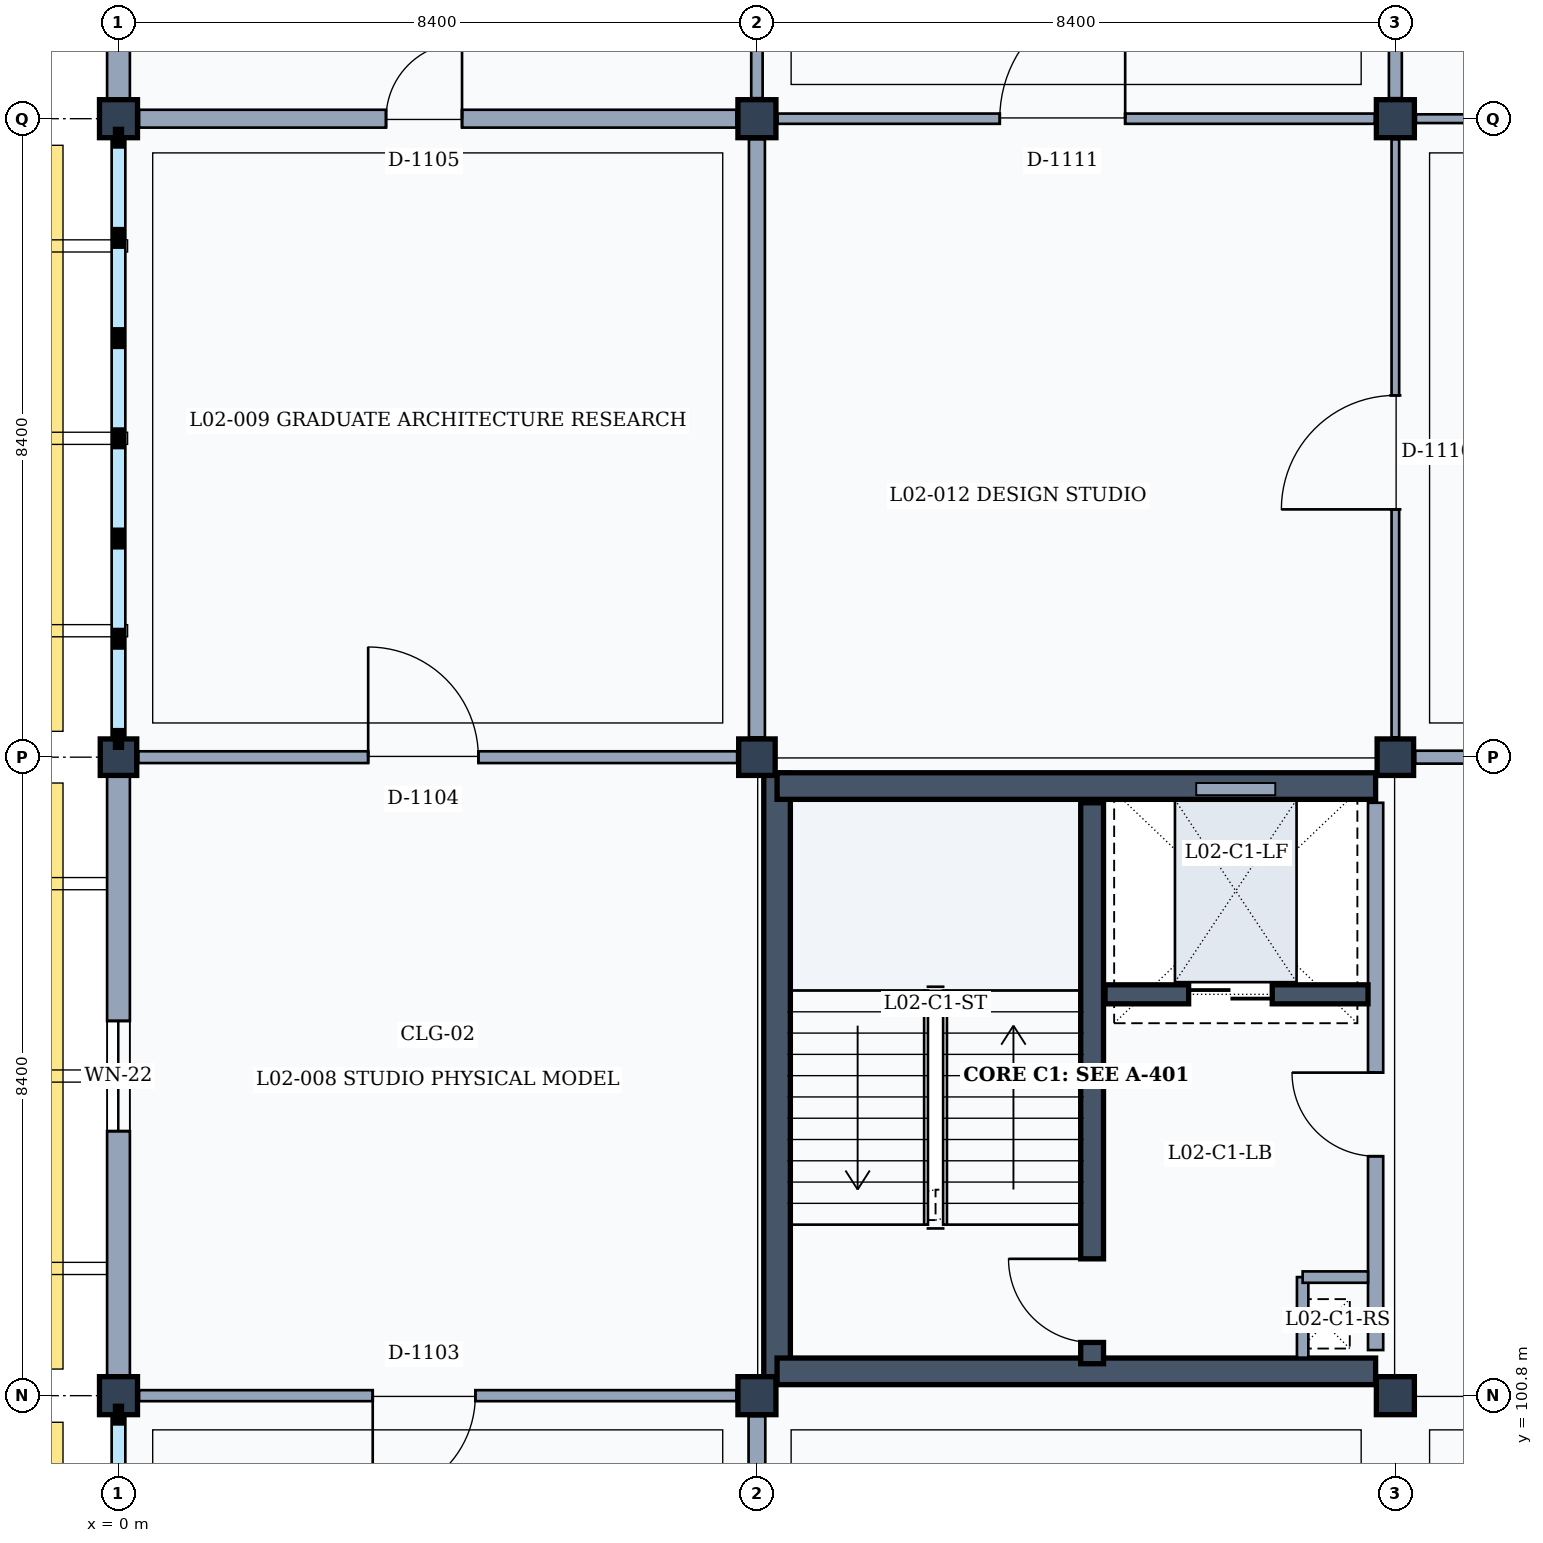
"""IFC4 building model, lengths in metres.
Left out: names, types, materials, properties, quantities, classifications, styles, units other than length and angle.
Written with IfcOpenShell. Run it as: python <this file> out.ifc"""

import sys

from ifc_helpers import new_model, si_unit, direction, frame, frame_2d, origin, origin_2d, place, context, subcontext, project, spatial, rectangle, extrude, element, fill, save


model = new_model("IFC4")
c1 = context("Model", 3, precision=1e-05, world=origin(), true_north=direction((0.0, 1.0)))
c2 = subcontext(c1, "Body", "Model", "MODEL_VIEW")
j1 = project(units=[si_unit("LENGTHUNIT", "METRE"), si_unit("PLANEANGLEUNIT", "RADIAN")], contexts=[c1])
p1 = place(None, origin())
s1 = spatial("IfcSite", under=j1, at=p1, CompositionType="ELEMENT")
p2 = place(p1, origin())
s2 = spatial("IfcBuilding", under=s1, at=p2, CompositionType="ELEMENT")
p3 = place(p2, frame((0.0, 0.0, 9.6)))
s3 = spatial("IfcBuildingStorey", under=s2, at=p3, CompositionType="ELEMENT", Elevation=9.6)
p4 = place(p3, frame((0.0, 100.8, 0.0), z_axis=(0.0, 0.0, 1.0), x_axis=(1.0, 0.0, 0.0)))
e1 = element("IfcColumn", 1, at=p4, inside=s3, PredefinedType="COLUMN", context=c2, shape_type="SweptSolid", body=[
    extrude(rectangle(XDim=0.5, YDim=0.5, at=origin_2d()), origin(), (0.0, 0.0, 1.0), 4.2),
])
p5 = place(p3, frame((0.0, 109.2, 0.0), z_axis=(0.0, 0.0, 1.0), x_axis=(1.0, 0.0, 0.0)))
e2 = element("IfcColumn", 2, at=p5, inside=s3, PredefinedType="COLUMN", context=c2, shape_type="SweptSolid", body=[
    extrude(rectangle(XDim=0.48, YDim=0.48, at=origin_2d()), origin(), (0.0, 0.0, 1.0), 4.2),
])
for number, where, z_axis, x_axis in (
    (3, (0.0, 117.6, 0.0), (0.0, 0.0, 1.0), (1.0, 0.0, 0.0)),
    (4, (8.4, 100.8, 0.0), (0.0, 0.0, 1.0), (1.0, 0.0, 0.0)),
):
    element("IfcColumn", number, at=place(p3, frame(where, z_axis=z_axis, x_axis=x_axis)), inside=s3, PredefinedType="COLUMN", context=c2, shape_type="SweptSolid", body=[
        extrude(rectangle(XDim=0.5, YDim=0.5, at=origin_2d()), origin(), (0.0, 0.0, 1.0), 4.2),
    ])
p6 = place(p3, frame((8.4, 109.2, 0.0), z_axis=(0.0, 0.0, 1.0), x_axis=(1.0, 0.0, 0.0)))
e5 = element("IfcColumn", 5, at=p6, inside=s3, PredefinedType="COLUMN", context=c2, shape_type="SweptSolid", body=[
    extrude(rectangle(XDim=0.48, YDim=0.48, at=origin_2d()), origin(), (0.0, 0.0, 1.0), 4.2),
])
for number, where, z_axis, x_axis in (
    (6, (8.4, 117.6, 0.0), (0.0, 0.0, 1.0), (1.0, 0.0, 0.0)),
    (7, (16.8, 100.8, 0.0), (0.0, 0.0, 1.0), (1.0, 0.0, 0.0)),
):
    element("IfcColumn", number, at=place(p3, frame(where, z_axis=z_axis, x_axis=x_axis)), inside=s3, PredefinedType="COLUMN", context=c2, shape_type="SweptSolid", body=[
        extrude(rectangle(XDim=0.5, YDim=0.5, at=origin_2d()), origin(), (0.0, 0.0, 1.0), 4.2),
    ])
p7 = place(p3, frame((16.8, 109.2, 0.0), z_axis=(0.0, 0.0, 1.0), x_axis=(1.0, 0.0, 0.0)))
e8 = element("IfcColumn", 8, at=p7, inside=s3, PredefinedType="COLUMN", context=c2, shape_type="SweptSolid", body=[
    extrude(rectangle(XDim=0.48, YDim=0.48, at=origin_2d()), origin(), (0.0, 0.0, 1.0), 4.2),
])
p8 = place(p3, frame((16.8, 117.6, 0.0), z_axis=(0.0, 0.0, 1.0), x_axis=(1.0, 0.0, 0.0)))
e9 = element("IfcColumn", 9, at=p8, inside=s3, PredefinedType="COLUMN", context=c2, shape_type="SweptSolid", body=[
    extrude(rectangle(XDim=0.5, YDim=0.5, at=origin_2d()), origin(), (0.0, 0.0, 1.0), 4.2),
])
p9 = place(p3, frame((0.0, 101.05, 0.0), z_axis=(0.0, 0.0, 1.0), x_axis=(0.0, 1.0, 0.0)))
e10 = element("IfcWall", 10, at=p9, inside=s3, PredefinedType="SOLIDWALL", context=c2, shape_type="SweptSolid", body=[
    extrude(rectangle(XDim=7.91, YDim=0.3, at=frame_2d((3.955, 0.0))), origin(), (0.0, 0.0, 1.0), 3.36),
])
p10 = place(p9, frame((3.23, 0.0, 0.9)))
e11 = element("IfcOpeningElement", 11, at=p10, cuts=e10, PredefinedType="OPENING", context=c2, shape_type="SweptSolid", body=[
    extrude(rectangle(XDim=1.45, YDim=1.8, at=frame_2d((0.725, 0.9))), frame((0.0, 0.16, 0.0), z_axis=(0.0, -1.0, 0.0), x_axis=(1.0, 0.0, 0.0)), (0.0, 0.0, 1.0), 0.32),
])
p11 = place(p3, frame((0.0, 117.85, 0.0), z_axis=(0.0, 0.0, 1.0), x_axis=(0.0, 1.0, 0.0)))
e12 = element("IfcWall", 12, at=p11, inside=s3, PredefinedType="SOLIDWALL", context=c2, shape_type="SweptSolid", body=[
    extrude(rectangle(XDim=7.91, YDim=0.3, at=frame_2d((3.955, 0.0))), origin(), (0.0, 0.0, 1.0), 3.36),
])
p12 = place(p3, frame((8.665, 101.05, 0.0), z_axis=(0.0, 0.0, 1.0), x_axis=(0.0, 1.0, 0.0)))
e13 = element("IfcWall", 13, at=p12, inside=s3, PredefinedType="SHEAR", context=c2, shape_type="SweptSolid", body=[
    extrude(rectangle(XDim=7.94, YDim=0.35, at=frame_2d((3.97, 0.0))), origin(), (0.0, 0.0, 1.0), 3.96),
])
p13 = place(p3, frame((8.665, 108.82, 0.0), z_axis=(0.0, 0.0, 1.0), x_axis=(1.0, 0.0, 0.0)))
e14 = element("IfcWall", 14, at=p13, inside=s3, PredefinedType="SHEAR", context=c2, shape_type="SweptSolid", body=[
    extrude(rectangle(XDim=7.875, YDim=0.35, at=frame_2d((3.938, 0.0))), origin(), (0.0, 0.0, 1.0), 3.96),
])
p14 = place(p3, frame((16.54, 108.6, 0.0), z_axis=(0.0, 0.0, 1.0), x_axis=(0.0, -1.0, 0.0)))
e15 = element("IfcWall", 15, at=p14, inside=s3, PredefinedType="PARTITIONING", context=c2, shape_type="SweptSolid", body=[
    extrude(rectangle(XDim=7.2, YDim=0.2, at=frame_2d((3.6, 0.0))), origin(), (0.0, 0.0, 1.0), 3.32),
])
p15 = place(p14, frame((3.55, 0.0, 0.0)))
e16 = element("IfcOpeningElement", 16, at=p15, cuts=e15, PredefinedType="OPENING", context=c2, shape_type="SweptSolid", body=[
    extrude(rectangle(XDim=1.1, YDim=2.15, at=frame_2d((0.55, 1.075))), frame((0.0, 0.11, 0.0), z_axis=(0.0, -1.0, 0.0), x_axis=(1.0, 0.0, 0.0)), (0.0, 0.0, 1.0), 0.22),
])
p16 = place(p3, frame((16.54, 101.12, 0.0), z_axis=(0.0, 0.0, 1.0), x_axis=(-1.0, 0.0, 0.0)))
e17 = element("IfcWall", 17, at=p16, inside=s3, PredefinedType="SHEAR", context=c2, shape_type="SweptSolid", body=[
    extrude(rectangle(XDim=7.875, YDim=0.35, at=frame_2d((3.938, 0.0))), origin(), (0.0, 0.0, 1.0), 3.96),
])
p17 = place(p3, frame((12.81, 101.22, 0.0), z_axis=(0.0, 0.0, 1.0), x_axis=(0.0, 1.0, 0.0)))
e18 = element("IfcWall", 18, at=p17, inside=s3, PredefinedType="SHEAR", context=c2, shape_type="SweptSolid", body=[
    extrude(rectangle(XDim=7.38, YDim=0.3, at=frame_2d((3.69, 0.0))), origin(), (0.0, 0.0, 1.0), 3.96),
])
p18 = place(p17, frame((0.28, 0.0, 0.0)))
e19 = element("IfcOpeningElement", 19, at=p18, cuts=e18, PredefinedType="OPENING", context=c2, shape_type="SweptSolid", body=[
    extrude(rectangle(XDim=1.1, YDim=2.15, at=frame_2d((0.55, 1.075))), frame((0.0, 0.16, 0.0), z_axis=(0.0, -1.0, 0.0), x_axis=(1.0, 0.0, 0.0)), (0.0, 0.0, 1.0), 0.32),
])
p19 = place(p3, frame((15.58, 102.36, 0.0), z_axis=(0.0, 0.0, 1.0), x_axis=(0.0, -1.0, 0.0)))
e20 = element("IfcWall", 20, at=p19, inside=s3, PredefinedType="PARTITIONING", context=c2, shape_type="SweptSolid", body=[
    extrude(rectangle(XDim=1.06, YDim=0.15, at=frame_2d((0.53, 0.0))), origin(), (0.0, 0.0, 1.0), 3.32),
])
p20 = place(p3, frame((15.58, 102.36, 0.0), z_axis=(0.0, 0.0, 1.0), x_axis=(1.0, 0.0, 0.0)))
e21 = element("IfcWall", 21, at=p20, inside=s3, PredefinedType="PARTITIONING", context=c2, shape_type="SweptSolid", body=[
    extrude(rectangle(XDim=0.86, YDim=0.15, at=frame_2d((0.43, 0.0))), origin(), (0.0, 0.0, 1.0), 3.32),
])
p21 = place(p3, frame((12.98, 106.08, 0.0), z_axis=(0.0, 0.0, 1.0), x_axis=(1.0, 0.0, 0.0)))
e22 = element("IfcWall", 22, at=p21, inside=s3, PredefinedType="SHEAR", context=c2, shape_type="SweptSolid", body=[
    extrude(rectangle(XDim=3.46, YDim=0.25, at=frame_2d((1.73, 0.0))), origin(), (0.0, 0.0, 1.0), 3.96),
])
p22 = place(p21, frame((1.1, 0.0, 0.0)))
e23 = element("IfcOpeningElement", 23, at=p22, cuts=e22, PredefinedType="OPENING", context=c2, shape_type="SweptSolid", body=[
    extrude(rectangle(XDim=1.1, YDim=2.15, at=frame_2d((0.55, 1.075))), frame((0.0, 0.135, 0.0), z_axis=(0.0, -1.0, 0.0), x_axis=(1.0, 0.0, 0.0)), (0.0, 0.0, 1.0), 0.27),
])
p23 = place(p3, frame((8.4, 92.66, 0.0), z_axis=(0.0, 0.0, 1.0), x_axis=(0.0, 1.0, 0.0)))
e24 = element("IfcWall", 24, at=p23, inside=s3, PredefinedType="PARTITIONING", context=c2, shape_type="SweptSolid", body=[
    extrude(rectangle(XDim=7.87, YDim=0.22, at=frame_2d((3.935, 0.0))), origin(), (0.0, 0.0, 1.0), 3.32),
])
p24 = place(p23, frame((3.125, 0.0, 0.0)))
e25 = element("IfcOpeningElement", 25, at=p24, cuts=e24, PredefinedType="OPENING", context=c2, shape_type="SweptSolid", body=[
    extrude(rectangle(XDim=1.25, YDim=2.3, at=frame_2d((0.625, 1.15))), frame((0.0, 0.12, 0.0), z_axis=(0.0, -1.0, 0.0), x_axis=(1.0, 0.0, 0.0)), (0.0, 0.0, 1.0), 0.24),
])
p25 = place(p3, frame((0.27, 100.8, 0.0), z_axis=(0.0, 0.0, 1.0), x_axis=(1.0, 0.0, 0.0)))
e26 = element("IfcWall", 26, at=p25, inside=s3, PredefinedType="PARTITIONING", context=c2, shape_type="SweptSolid", body=[
    extrude(rectangle(XDim=7.86, YDim=0.145, at=frame_2d((3.93, 0.0))), origin(), (0.0, 0.0, 1.0), 3.32),
])
p26 = place(p25, frame((3.075, 0.0, 0.0)))
e27 = element("IfcOpeningElement", 27, at=p26, cuts=e26, PredefinedType="OPENING", context=c2, shape_type="SweptSolid", body=[
    extrude(rectangle(XDim=1.35, YDim=2.25, at=frame_2d((0.675, 1.125))), frame((0.0, 0.083, 0.0), z_axis=(0.0, -1.0, 0.0), x_axis=(1.0, 0.0, 0.0)), (0.0, 0.0, 1.0), 0.165),
])
p27 = place(p3, frame((0.26, 109.2, 0.0), z_axis=(0.0, 0.0, 1.0), x_axis=(1.0, 0.0, 0.0)))
e28 = element("IfcWall", 28, at=p27, inside=s3, PredefinedType="PARTITIONING", context=c2, shape_type="SweptSolid", body=[
    extrude(rectangle(XDim=7.88, YDim=0.155, at=frame_2d((3.94, 0.0))), origin(), (0.0, 0.0, 1.0), 3.32),
])
p28 = place(p27, frame((3.025, 0.0, 0.0)))
e29 = element("IfcOpeningElement", 29, at=p28, cuts=e28, PredefinedType="OPENING", context=c2, shape_type="SweptSolid", body=[
    extrude(rectangle(XDim=1.45, YDim=2.35, at=frame_2d((0.725, 1.175))), frame((0.0, 0.087, 0.0), z_axis=(0.0, -1.0, 0.0), x_axis=(1.0, 0.0, 0.0)), (0.0, 0.0, 1.0), 0.175),
])
p29 = place(p3, frame((8.4, 109.46, 0.0), z_axis=(0.0, 0.0, 1.0), x_axis=(0.0, 1.0, 0.0)))
e30 = element("IfcWall", 30, at=p29, inside=s3, PredefinedType="PARTITIONING", context=c2, shape_type="SweptSolid", body=[
    extrude(rectangle(XDim=7.87, YDim=0.21, at=frame_2d((3.935, 0.0))), origin(), (0.0, 0.0, 1.0), 3.32),
])
p30 = place(p3, frame((0.27, 117.6, 0.0), z_axis=(0.0, 0.0, 1.0), x_axis=(1.0, 0.0, 0.0)))
e31 = element("IfcWall", 31, at=p30, inside=s3, PredefinedType="PARTITIONING", context=c2, shape_type="SweptSolid", body=[
    extrude(rectangle(XDim=7.86, YDim=0.235, at=frame_2d((3.93, 0.0))), origin(), (0.0, 0.0, 1.0), 3.32),
])
p31 = place(p30, frame((3.25, 0.0, 0.0)))
e32 = element("IfcOpeningElement", 32, at=p31, cuts=e31, PredefinedType="OPENING", context=c2, shape_type="SweptSolid", body=[
    extrude(rectangle(XDim=1.0, YDim=2.15, at=frame_2d((0.5, 1.075))), frame((0.0, 0.127, 0.0), z_axis=(0.0, -1.0, 0.0), x_axis=(1.0, 0.0, 0.0)), (0.0, 0.0, 1.0), 0.255),
])
p32 = place(p3, frame((8.4, 117.87, 0.0), z_axis=(0.0, 0.0, 1.0), x_axis=(0.0, 1.0, 0.0)))
e33 = element("IfcWall", 33, at=p32, inside=s3, PredefinedType="PARTITIONING", context=c2, shape_type="SweptSolid", body=[
    extrude(rectangle(XDim=7.87, YDim=0.15, at=frame_2d((3.935, 0.0))), origin(), (0.0, 0.0, 1.0), 3.32),
])
p33 = place(p3, frame((16.8, 109.46, 0.0), z_axis=(0.0, 0.0, 1.0), x_axis=(0.0, 1.0, 0.0)))
e34 = element("IfcWall", 34, at=p33, inside=s3, PredefinedType="MOVABLE", context=c2, shape_type="SweptSolid", body=[
    extrude(rectangle(XDim=7.87, YDim=0.1, at=frame_2d((3.935, 0.0))), origin(), (0.0, 0.0, 1.0), 3.32),
])
p34 = place(p33, frame((3.0, 0.0, 0.0)))
e35 = element("IfcOpeningElement", 35, at=p34, cuts=e34, PredefinedType="OPENING", context=c2, shape_type="SweptSolid", body=[
    extrude(rectangle(XDim=1.5, YDim=2.3, at=frame_2d((0.75, 1.15))), frame((0.0, 0.06, 0.0), z_axis=(0.0, -1.0, 0.0), x_axis=(1.0, 0.0, 0.0)), (0.0, 0.0, 1.0), 0.12),
])
p35 = place(p3, frame((8.67, 117.6, 0.0), z_axis=(0.0, 0.0, 1.0), x_axis=(1.0, 0.0, 0.0)))
e36 = element("IfcWall", 36, at=p35, inside=s3, PredefinedType="PARTITIONING", context=c2, shape_type="SweptSolid", body=[
    extrude(rectangle(XDim=7.86, YDim=0.135, at=frame_2d((3.93, 0.0))), origin(), (0.0, 0.0, 1.0), 3.32),
])
p36 = place(p35, frame((2.925, 0.0, 0.0)))
e37 = element("IfcOpeningElement", 37, at=p36, cuts=e36, PredefinedType="OPENING", context=c2, shape_type="SweptSolid", body=[
    extrude(rectangle(XDim=1.65, YDim=2.25, at=frame_2d((0.825, 1.125))), frame((0.0, 0.077, 0.0), z_axis=(0.0, -1.0, 0.0), x_axis=(1.0, 0.0, 0.0)), (0.0, 0.0, 1.0), 0.155),
])
p37 = place(p3, frame((16.8, 117.87, 0.0), z_axis=(0.0, 0.0, 1.0), x_axis=(0.0, 1.0, 0.0)))
e38 = element("IfcWall", 38, at=p37, inside=s3, PredefinedType="PARTITIONING", context=c2, shape_type="SweptSolid", body=[
    extrude(rectangle(XDim=7.87, YDim=0.17, at=frame_2d((3.935, 0.0))), origin(), (0.0, 0.0, 1.0), 3.32),
])
p38 = place(p3, frame((17.06, 109.2, 0.0), z_axis=(0.0, 0.0, 1.0), x_axis=(1.0, 0.0, 0.0)))
e39 = element("IfcWall", 39, at=p38, inside=s3, PredefinedType="PARTITIONING", context=c2, shape_type="SweptSolid", body=[
    extrude(rectangle(XDim=7.88, YDim=0.17, at=frame_2d((3.94, 0.0))), origin(), (0.0, 0.0, 1.0), 3.32),
])
p39 = place(p38, frame((3.025, 0.0, 0.0)))
e40 = element("IfcOpeningElement", 40, at=p39, cuts=e39, PredefinedType="OPENING", context=c2, shape_type="SweptSolid", body=[
    extrude(rectangle(XDim=1.45, YDim=2.35, at=frame_2d((0.725, 1.175))), frame((0.0, 0.095, 0.0), z_axis=(0.0, -1.0, 0.0), x_axis=(1.0, 0.0, 0.0)), (0.0, 0.0, 1.0), 0.19),
])
p40 = place(p3, frame((17.07, 117.6, 0.0), z_axis=(0.0, 0.0, 1.0), x_axis=(1.0, 0.0, 0.0)))
e41 = element("IfcWall", 41, at=p40, inside=s3, PredefinedType="PARTITIONING", context=c2, shape_type="SweptSolid", body=[
    extrude(rectangle(XDim=7.86, YDim=0.115, at=frame_2d((3.93, 0.0))), origin(), (0.0, 0.0, 1.0), 3.32),
])
p41 = place(p40, frame((3.25, 0.0, 0.0)))
e42 = element("IfcOpeningElement", 42, at=p41, cuts=e41, PredefinedType="OPENING", context=c2, shape_type="SweptSolid", body=[
    extrude(rectangle(XDim=1.0, YDim=2.15, at=frame_2d((0.5, 1.075))), frame((0.0, 0.067, 0.0), z_axis=(0.0, -1.0, 0.0), x_axis=(1.0, 0.0, 0.0)), (0.0, 0.0, 1.0), 0.135),
])
p42 = place(p10, origin())
e43 = element("IfcWindow", 43, at=p42, inside=s3, PartitioningType="SINGLE_PANEL", PredefinedType="WINDOW", context=c2, shape_type="SweptSolid", body=[
    extrude(rectangle(XDim=1.45, YDim=1.8, at=frame_2d((0.725, 0.9))), frame((0.0, 0.03, 0.0), z_axis=(0.0, -1.0, 0.0), x_axis=(1.0, 0.0, 0.0)), (0.0, 0.0, 1.0), 0.06),
])
fill(e11, e43)
p43 = place(p15, frame((1.1, 0.0, 0.0), z_axis=(0.0, 0.0, 1.0), x_axis=(-1.0, 0.0, 0.0)))
e44 = element("IfcDoor", 44, at=p43, inside=s3, OperationType="SINGLE_SWING_RIGHT", PredefinedType="DOOR", context=c2, shape_type="SweptSolid", body=[
    extrude(rectangle(XDim=1.1, YDim=2.15, at=frame_2d((0.55, 1.075))), frame((0.0, 0.025, 0.0), z_axis=(0.0, -1.0, 0.0), x_axis=(1.0, 0.0, 0.0)), (0.0, 0.0, 1.0), 0.05),
])
fill(e16, e44)
p44 = place(p18, origin())
e45 = element("IfcDoor", 45, at=p44, inside=s3, OperationType="SINGLE_SWING_RIGHT", PredefinedType="DOOR", context=c2, shape_type="SweptSolid", body=[
    extrude(rectangle(XDim=1.1, YDim=2.15, at=frame_2d((0.55, 1.075))), frame((0.0, 0.025, 0.0), z_axis=(0.0, -1.0, 0.0), x_axis=(1.0, 0.0, 0.0)), (0.0, 0.0, 1.0), 0.05),
])
fill(e19, e45)
p45 = place(p22, origin())
e46 = element("IfcDoor", 46, at=p45, inside=s3, OperationType="DOUBLE_DOOR_SLIDING", PredefinedType="DOOR", context=c2, shape_type="SweptSolid", body=[
    extrude(rectangle(XDim=1.1, YDim=2.15, at=frame_2d((0.55, 1.075))), frame((0.0, 0.025, 0.0), z_axis=(0.0, -1.0, 0.0), x_axis=(1.0, 0.0, 0.0)), (0.0, 0.0, 1.0), 0.05),
])
fill(e23, e46)
p46 = place(p26, frame((1.35, 0.0, 0.0), z_axis=(0.0, 0.0, 1.0), x_axis=(-1.0, 0.0, 0.0)))
e47 = element("IfcDoor", 47, at=p46, inside=s3, OperationType="SINGLE_SWING_RIGHT", PredefinedType="DOOR", context=c2, shape_type="SweptSolid", body=[
    extrude(rectangle(XDim=1.35, YDim=2.25, at=frame_2d((0.675, 1.125))), frame((0.0, 0.025, 0.0), z_axis=(0.0, -1.0, 0.0), x_axis=(1.0, 0.0, 0.0)), (0.0, 0.0, 1.0), 0.05),
])
fill(e27, e47)
p47 = place(p28, origin())
e48 = element("IfcDoor", 48, at=p47, inside=s3, OperationType="SINGLE_SWING_LEFT", PredefinedType="DOOR", context=c2, shape_type="SweptSolid", body=[
    extrude(rectangle(XDim=1.45, YDim=2.35, at=frame_2d((0.725, 1.175))), frame((0.0, 0.025, 0.0), z_axis=(0.0, -1.0, 0.0), x_axis=(1.0, 0.0, 0.0)), (0.0, 0.0, 1.0), 0.05),
])
fill(e29, e48)
p48 = place(p31, origin())
e49 = element("IfcDoor", 49, at=p48, inside=s3, OperationType="SINGLE_SWING_RIGHT", PredefinedType="DOOR", context=c2, shape_type="SweptSolid", body=[
    extrude(rectangle(XDim=1.0, YDim=2.15, at=frame_2d((0.5, 1.075))), frame((0.0, 0.025, 0.0), z_axis=(0.0, -1.0, 0.0), x_axis=(1.0, 0.0, 0.0)), (0.0, 0.0, 1.0), 0.05),
])
fill(e32, e49)
p49 = place(p34, origin())
e50 = element("IfcDoor", 50, at=p49, inside=s3, OperationType="SINGLE_SWING_LEFT", PredefinedType="DOOR", context=c2, shape_type="SweptSolid", body=[
    extrude(rectangle(XDim=1.5, YDim=2.3, at=frame_2d((0.75, 1.15))), frame((0.0, 0.025, 0.0), z_axis=(0.0, -1.0, 0.0), x_axis=(1.0, 0.0, 0.0)), (0.0, 0.0, 1.0), 0.05),
])
fill(e35, e50)
p50 = place(p36, origin())
e51 = element("IfcDoor", 51, at=p50, inside=s3, OperationType="SINGLE_SWING_RIGHT", PredefinedType="DOOR", context=c2, shape_type="SweptSolid", body=[
    extrude(rectangle(XDim=1.65, YDim=2.25, at=frame_2d((0.825, 1.125))), frame((0.0, 0.025, 0.0), z_axis=(0.0, -1.0, 0.0), x_axis=(1.0, 0.0, 0.0)), (0.0, 0.0, 1.0), 0.05),
])
fill(e37, e51)
save(model, sys.argv[1])
